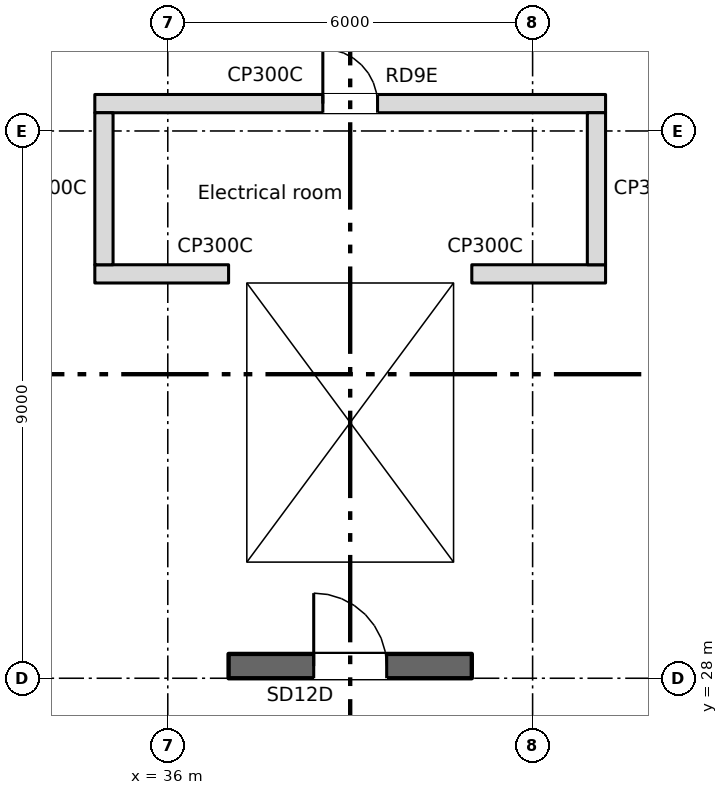
"""IFC4 building model, lengths in metres.
Left out: names, types, materials, properties, quantities, classifications, styles, units other than length and angle.
Written with IfcOpenShell. Run it as: python <this file> out.ifc"""

import sys

from ifc_helpers import new_model, si_unit, direction, frame, frame_2d, origin, place, context, subcontext, project, spatial, rectangle, extrude, element, fill, save


model = new_model("IFC4")
c1 = context("Model", 3, precision=1e-05, world=origin(), true_north=direction((0.0, 1.0)))
c2 = subcontext(c1, "Body", "Model", "MODEL_VIEW")
j1 = project(units=[si_unit("LENGTHUNIT", "METRE"), si_unit("PLANEANGLEUNIT", "RADIAN")], contexts=[c1])
p1 = place(None, origin())
s1 = spatial("IfcSite", under=j1, at=p1, CompositionType="ELEMENT")
p2 = place(p1, origin())
s2 = spatial("IfcBuilding", under=s1, at=p2, CompositionType="ELEMENT")
p3 = place(p2, frame((0.0, 0.0, 265.95)))
s3 = spatial("IfcBuildingStorey", under=s2, at=p3, CompositionType="ELEMENT", Elevation=265.95)
for number, where, z_axis, x_axis in (
    (1, (37.15, 28.4, 0.0), (0.0, 0.0, 1.0), (0.0, 1.0, 0.0)),
    (2, (40.85, 28.4, 0.0), (0.0, 0.0, 1.0), (0.0, 1.0, 0.0)),
):
    element("IfcWall", number, at=place(p3, frame(where, z_axis=z_axis, x_axis=x_axis)), inside=s3, PredefinedType="SHEAR", context=c2, shape_type="SweptSolid", body=[
        extrude(rectangle(XDim=6.1, YDim=0.3, at=frame_2d((3.05, 0.0))), origin(), (0.0, 0.0, 1.0), 5.4),
    ])
p4 = place(p3, frame((37.0, 28.2, 0.0), z_axis=(0.0, 0.0, 1.0), x_axis=(1.0, 0.0, 0.0)))
e3 = element("IfcWall", 3, at=p4, inside=s3, PredefinedType="SHEAR", context=c2, shape_type="SweptSolid", body=[
    extrude(rectangle(XDim=4.0, YDim=0.4, at=frame_2d((2.0, 0.0))), origin(), (0.0, 0.0, 1.0), 5.4),
])
p5 = place(p4, frame((1.4, 0.0, 0.0)))
e4 = element("IfcOpeningElement", 4, at=p5, cuts=e3, PredefinedType="OPENING", context=c2, shape_type="SweptSolid", body=[
    extrude(rectangle(XDim=1.2, YDim=2.1, at=frame_2d((0.6, 1.05))), frame((0.0, 0.21, 0.0), z_axis=(0.0, -1.0, 0.0), x_axis=(1.0, 0.0, 0.0)), (0.0, 0.0, 1.0), 0.42),
])
p6 = place(p3, frame((37.0, 34.65, 0.0), z_axis=(0.0, 0.0, 1.0), x_axis=(1.0, 0.0, 0.0)))
e5 = element("IfcWall", 5, at=p6, inside=s3, PredefinedType="SHEAR", context=c2, shape_type="SweptSolid", body=[
    extrude(rectangle(XDim=4.0, YDim=0.3, at=frame_2d((2.0, 0.0))), origin(), (0.0, 0.0, 1.0), 5.4),
])
for number, where, z_axis, x_axis in (
    (6, (34.8, 34.65, 0.0), (0.0, 0.0, 1.0), (1.0, 0.0, 0.0)),
    (7, (41.0, 34.65, 0.0), (0.0, 0.0, 1.0), (1.0, 0.0, 0.0)),
):
    element("IfcWall", number, at=place(p3, frame(where, z_axis=z_axis, x_axis=x_axis)), inside=s3, PredefinedType="PARTITIONING", context=c2, shape_type="SweptSolid", body=[
        extrude(rectangle(XDim=2.2, YDim=0.3, at=frame_2d((1.1, 0.0))), origin(), (0.0, 0.0, 1.0), 5.4),
    ])
p7 = place(p3, frame((34.8, 37.45, 0.0), z_axis=(0.0, 0.0, 1.0), x_axis=(1.0, 0.0, 0.0)))
e8 = element("IfcWall", 8, at=p7, inside=s3, PredefinedType="PARTITIONING", context=c2, shape_type="SweptSolid", body=[
    extrude(rectangle(XDim=8.4, YDim=0.3, at=frame_2d((4.2, 0.0))), origin(), (0.0, 0.0, 1.0), 5.4),
])
p8 = place(p7, frame((3.75, 0.0, 0.0)))
e9 = element("IfcOpeningElement", 9, at=p8, cuts=e8, PredefinedType="OPENING", context=c2, shape_type="SweptSolid", body=[
    extrude(rectangle(XDim=0.9, YDim=2.1, at=frame_2d((0.45, 1.05))), frame((0.0, 0.16, 0.0), z_axis=(0.0, -1.0, 0.0), x_axis=(1.0, 0.0, 0.0)), (0.0, 0.0, 1.0), 0.32),
])
for number, where, z_axis, x_axis in (
    (10, (34.95, 34.8, 0.0), (0.0, 0.0, 1.0), (0.0, 1.0, 0.0)),
    (11, (43.05, 34.8, 0.0), (0.0, 0.0, 1.0), (0.0, 1.0, 0.0)),
):
    element("IfcWall", number, at=place(p3, frame(where, z_axis=z_axis, x_axis=x_axis)), inside=s3, PredefinedType="PARTITIONING", context=c2, shape_type="SweptSolid", body=[
        extrude(rectangle(XDim=2.5, YDim=0.3, at=frame_2d((1.25, 0.0))), origin(), (0.0, 0.0, 1.0), 5.4),
    ])
p9 = place(p5, origin())
e12 = element("IfcDoor", 12, at=p9, inside=s3, OperationType="SINGLE_SWING_LEFT", PredefinedType="DOOR", context=c2, shape_type="SweptSolid", body=[
    extrude(rectangle(XDim=1.2, YDim=2.1, at=frame_2d((0.6, 1.05))), frame((0.0, 0.025, 0.0), z_axis=(0.0, -1.0, 0.0), x_axis=(1.0, 0.0, 0.0)), (0.0, 0.0, 1.0), 0.05),
])
fill(e4, e12)
p10 = place(p8, origin())
e13 = element("IfcDoor", 13, at=p10, inside=s3, OperationType="SINGLE_SWING_LEFT", PredefinedType="DOOR", context=c2, shape_type="SweptSolid", body=[
    extrude(rectangle(XDim=0.9, YDim=2.1, at=frame_2d((0.45, 1.05))), frame((0.0, 0.025, 0.0), z_axis=(0.0, -1.0, 0.0), x_axis=(1.0, 0.0, 0.0)), (0.0, 0.0, 1.0), 0.05),
])
fill(e9, e13)
save(model, sys.argv[1])
